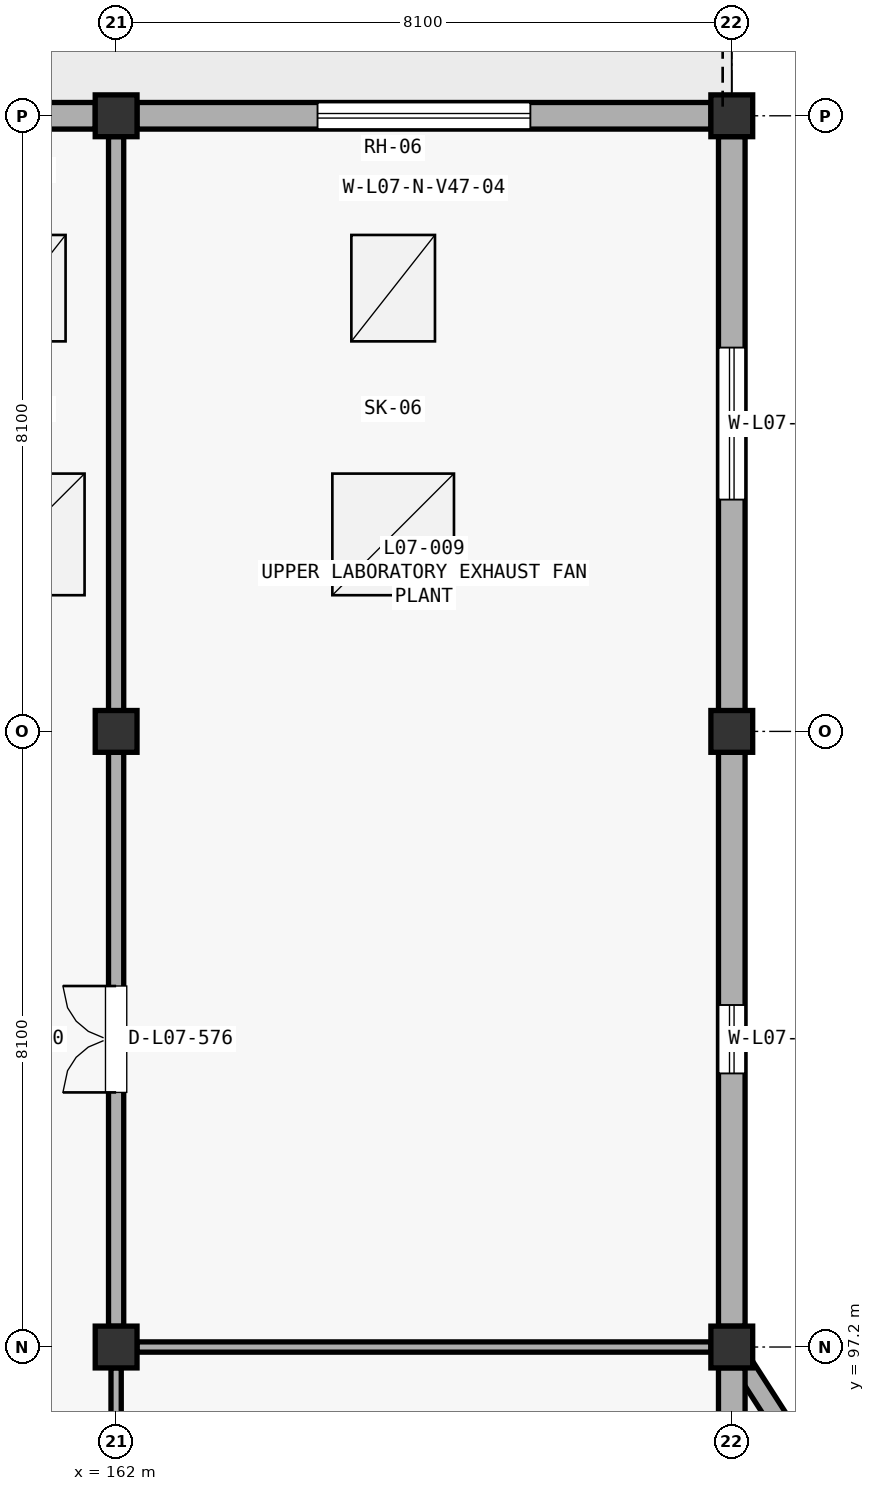
"""IFC4 building model, lengths in metres.
Left out: names, types, materials, properties, quantities, classifications, styles, units other than length and angle.
Written with IfcOpenShell. Run it as: python <this file> out.ifc"""

import sys

from ifc_helpers import new_model, si_unit, direction, frame, frame_2d, origin, origin_2d, place, context, subcontext, project, spatial, polyline, rectangle, outline, extrude, element, fill, save


model = new_model("IFC4")
c1 = context("Model", 3, precision=1e-05, world=origin(), true_north=direction((0.0, 1.0)))
c2 = subcontext(c1, "Body", "Model", "MODEL_VIEW")
j1 = project(units=[si_unit("LENGTHUNIT", "METRE"), si_unit("PLANEANGLEUNIT", "RADIAN")], contexts=[c1])
p1 = place(None, origin())
s1 = spatial("IfcSite", under=j1, at=p1, CompositionType="ELEMENT")
p2 = place(p1, origin())
s2 = spatial("IfcBuilding", under=s1, at=p2, CompositionType="ELEMENT")
p3 = place(p2, frame((0.0, 0.0, 31.79)))
s3 = spatial("IfcBuildingStorey", under=s2, at=p3, CompositionType="ELEMENT", Elevation=31.79)
for number, where, z_axis, x_axis in (
    (1, (162.0, 97.2, 0.0), (0.0, 0.0, 1.0), (1.0, 0.0, 0.0)),
    (2, (162.0, 105.3, 0.0), (0.0, 0.0, 1.0), (1.0, 0.0, 0.0)),
    (3, (162.0, 113.4, 0.0), (0.0, 0.0, 1.0), (1.0, 0.0, 0.0)),
    (4, (170.1, 97.2, 0.0), (0.0, 0.0, 1.0), (1.0, 0.0, 0.0)),
    (5, (170.1, 105.3, 0.0), (0.0, 0.0, 1.0), (1.0, 0.0, 0.0)),
    (6, (170.1, 113.4, 0.0), (0.0, 0.0, 1.0), (1.0, 0.0, 0.0)),
):
    element("IfcColumn", number, at=place(p3, frame(where, z_axis=z_axis, x_axis=x_axis)), inside=s3, PredefinedType="COLUMN", context=c2, shape_type="SweptSolid", body=[
        extrude(rectangle(XDim=0.55, YDim=0.55, at=origin_2d()), origin(), (0.0, 0.0, 1.0), 4.42),
    ])
p4 = place(p3, frame((175.289, 89.117, -0.35), z_axis=(0.0, 0.0, 1.0), x_axis=(-0.54023485523, 0.841514290547, 0.0)))
e7 = element("IfcWall", 7, at=p4, inside=s3, PredefinedType="STANDARD", context=c2, shape_type="SweptSolid", body=[
    extrude(outline(polyline([(0.0, 0.0), (9.586, 0.0), (9.585, 0.36), (0.0, 2.71), (0.0, 0.0)])), frame((0.0, 0.13, 0.0), z_axis=(0.0, -1.0, 0.0), x_axis=(1.0, 0.0, 0.0)), (0.0, 0.0, 1.0), 0.26),
])
p5 = place(p3, frame((154.173, 113.4, 0.0), z_axis=(0.0, 0.0, 1.0), x_axis=(1.0, 0.0, 0.0)))
e8 = element("IfcWall", 8, at=p5, inside=s3, PredefinedType="STANDARD", context=c2, shape_type="SweptSolid", body=[
    extrude(rectangle(XDim=7.554, YDim=0.35, at=frame_2d((3.777, 0.0))), origin(), (0.0, 0.0, 1.0), 3.512),
])
p6 = place(p5, frame((2.877, 0.0, 0.0)))
e9 = element("IfcOpeningElement", 9, at=p6, cuts=e8, PredefinedType="OPENING", context=c2, shape_type="SweptSolid", body=[
    extrude(rectangle(XDim=1.8, YDim=2.2, at=frame_2d((0.9, 1.1))), frame((0.0, 0.185, 0.0), z_axis=(0.0, -1.0, 0.0), x_axis=(1.0, 0.0, 0.0)), (0.0, 0.0, 1.0), 0.37),
])
p7 = place(p3, frame((162.273, 113.4, 0.0), z_axis=(0.0, 0.0, 1.0), x_axis=(1.0, 0.0, 0.0)))
e10 = element("IfcWall", 10, at=p7, inside=s3, PredefinedType="STANDARD", context=c2, shape_type="SweptSolid", body=[
    extrude(rectangle(XDim=7.554, YDim=0.35, at=frame_2d((3.777, 0.0))), origin(), (0.0, 0.0, 1.0), 3.562),
])
p8 = place(p7, frame((2.377, 0.0, 0.85)))
e11 = element("IfcOpeningElement", 11, at=p8, cuts=e10, PredefinedType="OPENING", context=c2, shape_type="SweptSolid", body=[
    extrude(rectangle(XDim=2.8, YDim=1.85, at=frame_2d((1.4, 0.925))), frame((0.0, 0.185, 0.0), z_axis=(0.0, -1.0, 0.0), x_axis=(1.0, 0.0, 0.0)), (0.0, 0.0, 1.0), 0.37),
])
p9 = place(p3, frame((170.1, 89.373, 0.0), z_axis=(0.0, 0.0, 1.0), x_axis=(0.0, 1.0, 0.0)))
e12 = element("IfcWall", 12, at=p9, inside=s3, PredefinedType="STANDARD", context=c2, shape_type="SweptSolid", body=[
    extrude(rectangle(XDim=7.554, YDim=0.35, at=frame_2d((3.777, 0.0))), origin(), (0.0, 0.0, 1.0), 3.512),
])
p10 = place(p9, frame((1.977, 0.0, 0.85)))
e13 = element("IfcOpeningElement", 13, at=p10, cuts=e12, PredefinedType="OPENING", context=c2, shape_type="SweptSolid", body=[
    extrude(rectangle(XDim=3.6, YDim=1.9, at=frame_2d((1.8, 0.95))), frame((0.0, 0.185, 0.0), z_axis=(0.0, -1.0, 0.0), x_axis=(1.0, 0.0, 0.0)), (0.0, 0.0, 1.0), 0.37),
])
p11 = place(p3, frame((170.1, 97.473, 0.0), z_axis=(0.0, 0.0, 1.0), x_axis=(0.0, 1.0, 0.0)))
e14 = element("IfcWall", 14, at=p11, inside=s3, PredefinedType="STANDARD", context=c2, shape_type="SweptSolid", body=[
    extrude(rectangle(XDim=7.554, YDim=0.35, at=frame_2d((3.777, 0.0))), origin(), (0.0, 0.0, 1.0), 3.562),
])
p12 = place(p11, frame((3.327, 0.0, 0.85)))
e15 = element("IfcOpeningElement", 15, at=p12, cuts=e14, PredefinedType="OPENING", context=c2, shape_type="SweptSolid", body=[
    extrude(rectangle(XDim=0.9, YDim=1.9, at=frame_2d((0.45, 0.95))), frame((0.0, 0.185, 0.0), z_axis=(0.0, -1.0, 0.0), x_axis=(1.0, 0.0, 0.0)), (0.0, 0.0, 1.0), 0.37),
])
p13 = place(p3, frame((170.1, 105.573, 0.0), z_axis=(0.0, 0.0, 1.0), x_axis=(0.0, 1.0, 0.0)))
e16 = element("IfcWall", 16, at=p13, inside=s3, PredefinedType="STANDARD", context=c2, shape_type="SweptSolid", body=[
    extrude(rectangle(XDim=7.554, YDim=0.35, at=frame_2d((3.777, 0.0))), origin(), (0.0, 0.0, 1.0), 3.312),
])
p14 = place(p13, frame((2.777, 0.0, 0.85)))
e17 = element("IfcOpeningElement", 17, at=p14, cuts=e16, PredefinedType="OPENING", context=c2, shape_type="SweptSolid", body=[
    extrude(rectangle(XDim=2.0, YDim=1.4, at=frame_2d((1.0, 0.7))), frame((0.0, 0.185, 0.0), z_axis=(0.0, -1.0, 0.0), x_axis=(1.0, 0.0, 0.0)), (0.0, 0.0, 1.0), 0.37),
])
p15 = place(p3, frame((162.0, 89.373, 0.0), z_axis=(0.0, 0.0, 1.0), x_axis=(0.0, 1.0, 0.0)))
e18 = element("IfcWall", 18, at=p15, inside=s3, PredefinedType="PARTITIONING", context=c2, shape_type="SweptSolid", body=[
    extrude(rectangle(XDim=7.554, YDim=0.135, at=frame_2d((3.777, 0.0))), origin(), (0.0, 0.0, 1.0), 3.212),
])
p16 = place(p3, frame((162.273, 97.2, 0.0), z_axis=(0.0, 0.0, 1.0), x_axis=(1.0, 0.0, 0.0)))
e19 = element("IfcWall", 19, at=p16, inside=s3, PredefinedType="PARTITIONING", context=c2, shape_type="SweptSolid", body=[
    extrude(rectangle(XDim=7.554, YDim=0.135, at=frame_2d((3.777, 0.0))), origin(), (0.0, 0.0, 1.0), 3.412),
])
p17 = place(p3, frame((162.0, 97.473, 0.0), z_axis=(0.0, 0.0, 1.0), x_axis=(0.0, 1.0, 0.0)))
e20 = element("IfcWall", 20, at=p17, inside=s3, PredefinedType="PARTITIONING", context=c2, shape_type="SweptSolid", body=[
    extrude(rectangle(XDim=7.554, YDim=0.2, at=frame_2d((3.777, 0.0))), origin(), (0.0, 0.0, 1.0), 3.412),
])
p18 = place(p17, frame((3.077, 0.0, 0.0)))
e21 = element("IfcOpeningElement", 21, at=p18, cuts=e20, PredefinedType="OPENING", context=c2, shape_type="SweptSolid", body=[
    extrude(rectangle(XDim=1.4, YDim=2.2, at=frame_2d((0.7, 1.1))), frame((0.0, 0.11, 0.0), z_axis=(0.0, -1.0, 0.0), x_axis=(1.0, 0.0, 0.0)), (0.0, 0.0, 1.0), 0.22),
])
p19 = place(p3, frame((162.0, 105.573, 0.0), z_axis=(0.0, 0.0, 1.0), x_axis=(0.0, 1.0, 0.0)))
e22 = element("IfcWall", 22, at=p19, inside=s3, PredefinedType="PARTITIONING", context=c2, shape_type="SweptSolid", body=[
    extrude(rectangle(XDim=7.554, YDim=0.2, at=frame_2d((3.777, 0.0))), origin(), (0.0, 0.0, 1.0), 3.512),
])
p20 = place(p8, origin())
e23 = element("IfcWindow", 23, at=p20, inside=s3, PartitioningType="SINGLE_PANEL", PredefinedType="WINDOW", context=c2, shape_type="SweptSolid", body=[
    extrude(rectangle(XDim=2.8, YDim=1.85, at=frame_2d((1.4, 0.925))), frame((0.0, 0.03, 0.0), z_axis=(0.0, -1.0, 0.0), x_axis=(1.0, 0.0, 0.0)), (0.0, 0.0, 1.0), 0.06),
])
fill(e11, e23)
p21 = place(p12, origin())
e24 = element("IfcWindow", 24, at=p21, inside=s3, PartitioningType="SINGLE_PANEL", PredefinedType="WINDOW", context=c2, shape_type="SweptSolid", body=[
    extrude(rectangle(XDim=0.9, YDim=1.9, at=frame_2d((0.45, 0.95))), frame((0.0, 0.03, 0.0), z_axis=(0.0, -1.0, 0.0), x_axis=(1.0, 0.0, 0.0)), (0.0, 0.0, 1.0), 0.06),
])
fill(e15, e24)
p22 = place(p14, origin())
e25 = element("IfcWindow", 25, at=p22, inside=s3, PartitioningType="SINGLE_PANEL", PredefinedType="WINDOW", context=c2, shape_type="SweptSolid", body=[
    extrude(rectangle(XDim=2.0, YDim=1.4, at=frame_2d((1.0, 0.7))), frame((0.0, 0.03, 0.0), z_axis=(0.0, -1.0, 0.0), x_axis=(1.0, 0.0, 0.0)), (0.0, 0.0, 1.0), 0.06),
])
fill(e17, e25)
p23 = place(p2, frame((0.0, 0.0, 36.21)))
p24 = place(p23, origin())
p25 = place(p24, frame((160.785, 107.892, 0.0)))
p26 = place(p25, frame((0.0, 0.0, 0.25)))
e26 = element("IfcWindow", 26, at=p26, inside=s3, PartitioningType="SINGLE_PANEL", PredefinedType="SKYLIGHT", context=c2, shape_type="SweptSolid", body=[
    extrude(rectangle(XDim=1.6, YDim=1.6, at=origin_2d()), origin(), (0.0, 0.0, 1.0), 0.05),
])
p27 = place(p24, frame((165.645, 107.892, 0.0)))
p28 = place(p27, frame((0.0, 0.0, 0.25)))
e27 = element("IfcWindow", 27, at=p28, inside=s3, PartitioningType="SINGLE_PANEL", PredefinedType="SKYLIGHT", context=c2, shape_type="SweptSolid", body=[
    extrude(rectangle(XDim=1.6, YDim=1.6, at=origin_2d()), origin(), (0.0, 0.0, 1.0), 0.05),
])
p29 = place(p24, frame((160.785, 111.132, 0.0)))
p30 = place(p29, frame((0.0, 0.0, 0.25)))
e28 = element("IfcWindow", 28, at=p30, inside=s3, PartitioningType="SINGLE_PANEL", PredefinedType="USERDEFINED", context=c2, shape_type="SweptSolid", body=[
    extrude(rectangle(XDim=1.1, YDim=1.4, at=origin_2d()), origin(), (0.0, 0.0, 1.0), 0.05),
])
p31 = place(p24, frame((165.645, 111.132, 0.0)))
p32 = place(p31, frame((0.0, 0.0, 0.25)))
e29 = element("IfcWindow", 29, at=p32, inside=s3, PartitioningType="SINGLE_PANEL", PredefinedType="USERDEFINED", context=c2, shape_type="SweptSolid", body=[
    extrude(rectangle(XDim=1.1, YDim=1.4, at=origin_2d()), origin(), (0.0, 0.0, 1.0), 0.05),
])
p33 = place(p18, origin())
e30 = element("IfcDoor", 30, at=p33, inside=s3, OperationType="DOUBLE_SWING_LEFT", PredefinedType="DOOR", context=c2, shape_type="SweptSolid", body=[
    extrude(rectangle(XDim=1.4, YDim=2.2, at=frame_2d((0.7, 1.1))), frame((0.0, 0.025, 0.0), z_axis=(0.0, -1.0, 0.0), x_axis=(1.0, 0.0, 0.0)), (0.0, 0.0, 1.0), 0.05),
])
fill(e21, e30)
save(model, sys.argv[1])
